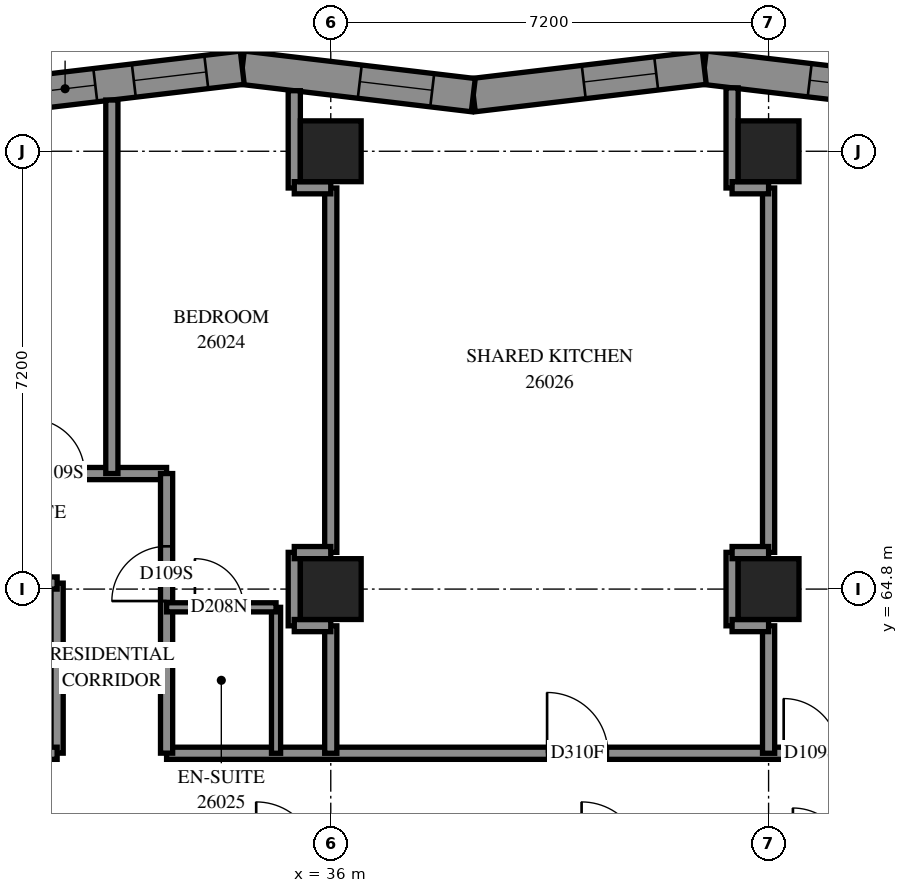
"""IFC4 building model, lengths in metres.
Left out: names, types, materials, properties, quantities, classifications, styles, units other than length and angle.
Written with IfcOpenShell. Run it as: python <this file> out.ifc"""

import sys

from ifc_helpers import new_model, si_unit, direction, frame, frame_2d, origin, origin_2d, place, context, subcontext, project, spatial, polyline, rectangle, outline, extrude, element, fill, save


model = new_model("IFC4")
c1 = context("Model", 3, precision=1e-05, world=origin(), true_north=direction((0.0, 1.0)))
c2 = subcontext(c1, "Body", "Model", "MODEL_VIEW")
j1 = project(units=[si_unit("LENGTHUNIT", "METRE"), si_unit("PLANEANGLEUNIT", "RADIAN")], contexts=[c1])
p1 = place(None, origin())
s1 = spatial("IfcSite", under=j1, at=p1, CompositionType="ELEMENT")
p2 = place(p1, origin())
s2 = spatial("IfcBuilding", under=s1, at=p2, CompositionType="ELEMENT")
p3 = place(p2, frame((0.0, 0.0, 98.2)))
s3 = spatial("IfcBuildingStorey", under=s2, at=p3, CompositionType="ELEMENT", Elevation=98.2)
for number, where, z_axis, x_axis in (
    (1, (36.0, 64.8, 0.0), (0.0, 0.0, 1.0), (1.0, 0.0, 0.0)),
    (2, (36.0, 72.0, 0.0), (0.0, 0.0, 1.0), (1.0, 0.0, 0.0)),
    (3, (43.2, 64.8, 0.0), (0.0, 0.0, 1.0), (1.0, 0.0, 0.0)),
    (4, (43.2, 72.0, 0.0), (0.0, 0.0, 1.0), (1.0, 0.0, 0.0)),
):
    element("IfcColumn", number, at=place(p3, frame(where, z_axis=z_axis, x_axis=x_axis)), inside=s3, PredefinedType="COLUMN", context=c2, shape_type="SweptSolid", body=[
        extrude(rectangle(XDim=1.0, YDim=1.0, at=origin_2d()), origin(), (0.0, 0.0, 1.0), 3.1),
    ])
p4 = place(p3, frame((45.942, 72.923, 0.0), z_axis=(0.0, 0.0, 1.0), x_axis=(-0.9930269402, 0.1178876415, 0.0)))
e5 = element("IfcWall", 5, at=p4, inside=s3, PredefinedType="SOLIDWALL", context=c2, shape_type="SweptSolid", body=[
    extrude(outline(polyline([(0.033, -0.275), (3.858, -0.275), (3.793, 0.275), (-0.033, 0.275), (0.033, -0.275)])), origin(), (0.0, 0.0, 1.0), 3.1),
])
p5 = place(p4, frame((0.88, 0.0, 0.5)))
e6 = element("IfcOpeningElement", 6, at=p5, cuts=e5, PredefinedType="OPENING", context=c2, shape_type="SweptSolid", body=[
    extrude(rectangle(XDim=1.2, YDim=2.45, at=frame_2d((0.6, 1.225))), frame((0.0, 0.285, 0.0), z_axis=(0.0, -1.0, 0.0), x_axis=(1.0, 0.0, 0.0)), (0.0, 0.0, 1.0), 0.57),
])
p6 = place(p3, frame((42.143, 73.374, 0.0), z_axis=(0.0, 0.0, 1.0), x_axis=(-0.9930269402, -0.1178876415, 0.0)))
e7 = element("IfcWall", 7, at=p6, inside=s3, PredefinedType="SOLIDWALL", context=c2, shape_type="SweptSolid", body=[
    extrude(outline(polyline([(-0.033, -0.275), (3.793, -0.275), (3.858, 0.275), (0.033, 0.275), (-0.033, -0.275)])), origin(), (0.0, 0.0, 1.0), 3.1),
])
p7 = place(p6, frame((0.797, 0.0, 0.5)))
e8 = element("IfcOpeningElement", 8, at=p7, cuts=e7, PredefinedType="OPENING", context=c2, shape_type="SweptSolid", body=[
    extrude(rectangle(XDim=1.2, YDim=2.45, at=frame_2d((0.6, 1.225))), frame((0.0, 0.285, 0.0), z_axis=(0.0, -1.0, 0.0), x_axis=(1.0, 0.0, 0.0)), (0.0, 0.0, 1.0), 0.57),
])
p8 = place(p3, frame((38.344, 72.923, 0.0), z_axis=(0.0, 0.0, 1.0), x_axis=(-0.9930265769, 0.1178907016, 0.0)))
e9 = element("IfcWall", 9, at=p8, inside=s3, PredefinedType="SOLIDWALL", context=c2, shape_type="SweptSolid", body=[
    extrude(outline(polyline([(0.033, -0.275), (3.858, -0.275), (3.793, 0.275), (-0.033, 0.275), (0.033, -0.275)])), origin(), (0.0, 0.0, 1.0), 3.1),
])
p9 = place(p8, frame((0.68, 0.0, 0.5)))
e10 = element("IfcOpeningElement", 10, at=p9, cuts=e9, PredefinedType="OPENING", context=c2, shape_type="SweptSolid", body=[
    extrude(rectangle(XDim=1.2, YDim=2.45, at=frame_2d((0.6, 1.225))), frame((0.0, 0.285, 0.0), z_axis=(0.0, -1.0, 0.0), x_axis=(1.0, 0.0, 0.0)), (0.0, 0.0, 1.0), 0.57),
])
p10 = place(p3, frame((34.545, 73.374, 0.0), z_axis=(0.0, 0.0, 1.0), x_axis=(-0.9930269402, -0.1178876415, 0.0)))
e11 = element("IfcWall", 11, at=p10, inside=s3, PredefinedType="SOLIDWALL", context=c2, shape_type="SweptSolid", body=[
    extrude(outline(polyline([(-0.033, -0.275), (3.793, -0.275), (3.858, 0.275), (0.033, 0.275), (-0.033, -0.275)])), origin(), (0.0, 0.0, 1.0), 3.1),
])
p11 = place(p10, frame((0.596, 0.0, 0.5)))
e12 = element("IfcOpeningElement", 12, at=p11, cuts=e11, PredefinedType="OPENING", context=c2, shape_type="SweptSolid", body=[
    extrude(rectangle(XDim=1.2, YDim=2.45, at=frame_2d((0.6, 1.225))), frame((0.0, 0.285, 0.0), z_axis=(0.0, -1.0, 0.0), x_axis=(1.0, 0.0, 0.0)), (0.0, 0.0, 1.0), 0.57),
])
p12 = place(p10, frame((2.434, 0.0, 0.45)))
e13 = element("IfcOpeningElement", 13, at=p12, cuts=e11, PredefinedType="OPENING", context=c2, shape_type="SweptSolid", body=[
    extrude(rectangle(XDim=1.0, YDim=2.5, at=frame_2d((0.5, 1.25))), frame((0.0, 0.285, 0.0), z_axis=(0.0, -1.0, 0.0), x_axis=(1.0, 0.0, 0.0)), (0.0, 0.0, 1.0), 0.57),
])
p13 = place(p3, frame((33.3, 62.1, 0.0), z_axis=(0.0, 0.0, 1.0), x_axis=(1.0, 0.0, 0.0)))
e14 = element("IfcWall", 14, at=p13, inside=s3, PredefinedType="PARTITIONING", context=c2, shape_type="SweptSolid", body=[
    extrude(rectangle(XDim=17.1, YDim=0.2, at=frame_2d((8.55, 0.0))), origin(), (0.0, 0.0, 1.0), 3.1),
])
p14 = place(p13, frame((6.258, 0.0, 0.0)))
e15 = element("IfcOpeningElement", 15, at=p14, cuts=e14, PredefinedType="OPENING", context=c2, shape_type="SweptSolid", body=[
    extrude(rectangle(XDim=1.0, YDim=2.1, at=frame_2d((0.5, 1.05))), frame((0.0, 0.11, 0.0), z_axis=(0.0, -1.0, 0.0), x_axis=(1.0, 0.0, 0.0)), (0.0, 0.0, 1.0), 0.22),
])
p15 = place(p13, frame((10.148, 0.0, 0.0)))
e16 = element("IfcOpeningElement", 16, at=p15, cuts=e14, PredefinedType="OPENING", context=c2, shape_type="SweptSolid", body=[
    extrude(rectangle(XDim=0.9, YDim=2.1, at=frame_2d((0.45, 1.05))), frame((0.0, 0.11, 0.0), z_axis=(0.0, -1.0, 0.0), x_axis=(1.0, 0.0, 0.0)), (0.0, 0.0, 1.0), 0.22),
])
p16 = place(p13, frame((15.729, 0.0, 0.0)))
e17 = element("IfcOpeningElement", 17, at=p16, cuts=e14, PredefinedType="OPENING", context=c2, shape_type="SweptSolid", body=[
    extrude(rectangle(XDim=0.9, YDim=2.1, at=frame_2d((0.45, 1.05))), frame((0.0, 0.11, 0.0), z_axis=(0.0, -1.0, 0.0), x_axis=(1.0, 0.0, 0.0)), (0.0, 0.0, 1.0), 0.22),
])
p17 = place(p3, frame((21.602, 66.7, 0.0), z_axis=(0.0, 0.0, 1.0), x_axis=(1.0, 0.0, 0.0)))
e18 = element("IfcWall", 18, at=p17, inside=s3, PredefinedType="PARTITIONING", context=c2, shape_type="SweptSolid", body=[
    extrude(rectangle(XDim=11.698, YDim=0.2, at=frame_2d((5.849, 0.0))), origin(), (0.0, 0.0, 1.0), 3.1),
])
p18 = place(p17, frame((1.79, 0.0, 0.0)))
e19 = element("IfcOpeningElement", 19, at=p18, cuts=e18, PredefinedType="OPENING", context=c2, shape_type="SweptSolid", body=[
    extrude(rectangle(XDim=1.0, YDim=2.1, at=frame_2d((0.5, 1.05))), frame((0.0, 0.11, 0.0), z_axis=(0.0, -1.0, 0.0), x_axis=(1.0, 0.0, 0.0)), (0.0, 0.0, 1.0), 0.22),
])
p19 = place(p17, frame((3.998, 0.0, 0.0)))
e20 = element("IfcOpeningElement", 20, at=p19, cuts=e18, PredefinedType="OPENING", context=c2, shape_type="SweptSolid", body=[
    extrude(rectangle(XDim=0.9, YDim=2.1, at=frame_2d((0.45, 1.05))), frame((0.0, 0.11, 0.0), z_axis=(0.0, -1.0, 0.0), x_axis=(1.0, 0.0, 0.0)), (0.0, 0.0, 1.0), 0.22),
])
p20 = place(p17, frame((9.448, 0.0, 0.0)))
e21 = element("IfcOpeningElement", 21, at=p20, cuts=e18, PredefinedType="OPENING", context=c2, shape_type="SweptSolid", body=[
    extrude(rectangle(XDim=0.9, YDim=2.1, at=frame_2d((0.45, 1.05))), frame((0.0, 0.11, 0.0), z_axis=(0.0, -1.0, 0.0), x_axis=(1.0, 0.0, 0.0)), (0.0, 0.0, 1.0), 0.22),
])
p21 = place(p3, frame((32.4, 66.7, 0.0), z_axis=(0.0, 0.0, 1.0), x_axis=(0.0, 1.0, 0.0)))
e22 = element("IfcWall", 22, at=p21, inside=s3, PredefinedType="PARTITIONING", context=c2, shape_type="SweptSolid", body=[
    extrude(rectangle(XDim=6.143, YDim=0.2, at=frame_2d((3.071, 0.0))), origin(), (0.0, 0.0, 1.0), 3.1),
])
for number, where, z_axis, x_axis in (
    (23, (36.0, 65.404, 0.0), (0.0, 0.0, 1.0), (0.0, 1.0, 0.0)),
    (24, (43.2, 65.404, 0.0), (0.0, 0.0, 1.0), (0.0, 1.0, 0.0)),
):
    element("IfcWall", number, at=place(p3, frame(where, z_axis=z_axis, x_axis=x_axis)), inside=s3, PredefinedType="PARTITIONING", context=c2, shape_type="SweptSolid", body=[
        extrude(rectangle(XDim=5.992, YDim=0.2, at=frame_2d((2.996, 0.0))), origin(), (0.0, 0.0, 1.0), 3.1),
    ])
p22 = place(p3, frame((33.3, 62.102, 0.0), z_axis=(0.0, 0.0, 1.0), x_axis=(0.0, 1.0, 0.0)))
e25 = element("IfcWall", 25, at=p22, inside=s3, PredefinedType="PARTITIONING", context=c2, shape_type="SweptSolid", body=[
    extrude(rectangle(XDim=4.598, YDim=0.2, at=frame_2d((2.299, 0.0))), origin(), (0.0, 0.0, 1.0), 3.1),
])
p23 = place(p22, frame((2.501, 0.0, 0.0)))
e26 = element("IfcOpeningElement", 26, at=p23, cuts=e25, PredefinedType="OPENING", context=c2, shape_type="SweptSolid", body=[
    extrude(rectangle(XDim=0.9, YDim=2.1, at=frame_2d((0.45, 1.05))), frame((0.0, 0.11, 0.0), z_axis=(0.0, -1.0, 0.0), x_axis=(1.0, 0.0, 0.0)), (0.0, 0.0, 1.0), 0.22),
])
p24 = place(p3, frame((31.5, 62.102, 0.0), z_axis=(0.0, 0.0, 1.0), x_axis=(0.0, 1.0, 0.0)))
e27 = element("IfcWall", 27, at=p24, inside=s3, PredefinedType="PARTITIONING", context=c2, shape_type="SweptSolid", body=[
    extrude(rectangle(XDim=2.796, YDim=0.2, at=frame_2d((1.398, 0.0))), origin(), (0.0, 0.0, 1.0), 3.1),
])
p25 = place(p3, frame((28.802, 62.1, 0.0), z_axis=(0.0, 0.0, 1.0), x_axis=(1.0, 0.0, 0.0)))
e28 = element("IfcWall", 28, at=p25, inside=s3, PredefinedType="PARTITIONING", context=c2, shape_type="SweptSolid", body=[
    extrude(rectangle(XDim=2.698, YDim=0.2, at=frame_2d((1.349, 0.0))), origin(), (0.0, 0.0, 1.0), 3.1),
])
p26 = place(p3, frame((35.1, 62.1, 0.0), z_axis=(0.0, 0.0, 1.0), x_axis=(0.0, 1.0, 0.0)))
e29 = element("IfcWall", 29, at=p26, inside=s3, PredefinedType="PARTITIONING", context=c2, shape_type="SweptSolid", body=[
    extrude(rectangle(XDim=2.4, YDim=0.15, at=frame_2d((1.2, 0.0))), origin(), (0.0, 0.0, 1.0), 3.1),
])
p27 = place(p3, frame((29.3, 64.9, 0.0), z_axis=(0.0, 0.0, 1.0), x_axis=(1.0, 0.0, 0.0)))
e30 = element("IfcWall", 30, at=p27, inside=s3, PredefinedType="PARTITIONING", context=c2, shape_type="SweptSolid", body=[
    extrude(rectangle(XDim=2.2, YDim=0.2, at=frame_2d((1.1, 0.0))), origin(), (0.0, 0.0, 1.0), 3.1),
])
p28 = place(p27, frame((0.31, 0.0, 0.0)))
e31 = element("IfcOpeningElement", 31, at=p28, cuts=e30, PredefinedType="OPENING", context=c2, shape_type="SweptSolid", body=[
    extrude(rectangle(XDim=1.0, YDim=2.1, at=frame_2d((0.5, 1.05))), frame((0.0, 0.11, 0.0), z_axis=(0.0, -1.0, 0.0), x_axis=(1.0, 0.0, 0.0)), (0.0, 0.0, 1.0), 0.22),
])
for number, where, z_axis, x_axis in (
    (32, (36.0, 62.1, 0.0), (0.0, 0.0, 1.0), (0.0, 1.0, 0.0)),
    (33, (43.2, 62.1, 0.0), (0.0, 0.0, 1.0), (0.0, 1.0, 0.0)),
):
    element("IfcWall", number, at=place(p3, frame(where, z_axis=z_axis, x_axis=x_axis)), inside=s3, PredefinedType="PARTITIONING", context=c2, shape_type="SweptSolid", body=[
        extrude(rectangle(XDim=2.096, YDim=0.2, at=frame_2d((1.048, 0.0))), origin(), (0.0, 0.0, 1.0), 3.1),
    ])
p29 = place(p3, frame((33.3, 64.5, 0.0), z_axis=(0.0, 0.0, 1.0), x_axis=(1.0, 0.0, 0.0)))
e34 = element("IfcWall", 34, at=p29, inside=s3, PredefinedType="PARTITIONING", context=c2, shape_type="SweptSolid", body=[
    extrude(rectangle(XDim=1.8, YDim=0.15, at=frame_2d((0.9, 0.0))), origin(), (0.0, 0.0, 1.0), 3.1),
])
p30 = place(p29, frame((0.466, 0.0, 0.0)))
e35 = element("IfcOpeningElement", 35, at=p30, cuts=e34, PredefinedType="OPENING", context=c2, shape_type="SweptSolid", body=[
    extrude(rectangle(XDim=0.8, YDim=2.1, at=frame_2d((0.4, 1.05))), frame((0.0, 0.085, 0.0), z_axis=(0.0, -1.0, 0.0), x_axis=(1.0, 0.0, 0.0)), (0.0, 0.0, 1.0), 0.17),
])
p31 = place(p3, frame((42.6, 71.396, 0.0), z_axis=(0.0, 0.0, 1.0), x_axis=(0.0, 1.0, 0.0)))
e36 = element("IfcWall", 36, at=p31, inside=s3, PredefinedType="PARTITIONING", context=c2, shape_type="SweptSolid", body=[
    extrude(rectangle(XDim=1.647, YDim=0.2, at=frame_2d((0.824, 0.0))), origin(), (0.0, 0.0, 1.0), 3.1),
])
p32 = place(p3, frame((35.4, 71.396, 0.0), z_axis=(0.0, 0.0, 1.0), x_axis=(0.0, 1.0, 0.0)))
e37 = element("IfcWall", 37, at=p32, inside=s3, PredefinedType="PARTITIONING", context=c2, shape_type="SweptSolid", body=[
    extrude(rectangle(XDim=1.6, YDim=0.2, at=frame_2d((0.8, 0.0))), origin(), (0.0, 0.0, 1.0), 3.1),
])
for number, where, z_axis, x_axis in (
    (38, (35.4, 64.196, 0.0), (0.0, 0.0, 1.0), (0.0, 1.0, 0.0)),
    (39, (42.6, 64.196, 0.0), (0.0, 0.0, 1.0), (0.0, 1.0, 0.0)),
):
    element("IfcWall", number, at=place(p3, frame(where, z_axis=z_axis, x_axis=x_axis)), inside=s3, PredefinedType="PARTITIONING", context=c2, shape_type="SweptSolid", body=[
        extrude(rectangle(XDim=1.208, YDim=0.2, at=frame_2d((0.604, 0.0))), origin(), (0.0, 0.0, 1.0), 3.1),
    ])
for number, where, z_axis, x_axis in (
    (40, (35.4, 71.4, 0.0), (0.0, 0.0, 1.0), (1.0, 0.0, 0.0)),
    (41, (42.6, 71.4, 0.0), (0.0, 0.0, 1.0), (1.0, 0.0, 0.0)),
    (42, (35.4, 65.4, 0.0), (0.0, 0.0, 1.0), (1.0, 0.0, 0.0)),
    (43, (42.6, 65.4, 0.0), (0.0, 0.0, 1.0), (1.0, 0.0, 0.0)),
    (44, (35.4, 64.2, 0.0), (0.0, 0.0, 1.0), (1.0, 0.0, 0.0)),
    (45, (42.6, 64.2, 0.0), (0.0, 0.0, 1.0), (1.0, 0.0, 0.0)),
):
    element("IfcWall", number, at=place(p3, frame(where, z_axis=z_axis, x_axis=x_axis)), inside=s3, PredefinedType="PARTITIONING", context=c2, shape_type="SweptSolid", body=[
        extrude(rectangle(XDim=0.6, YDim=0.2, at=frame_2d((0.3, 0.0))), origin(), (0.0, 0.0, 1.0), 3.1),
    ])
p33 = place(p5, origin())
e46 = element("IfcWindow", 46, at=p33, inside=s3, PartitioningType="SINGLE_PANEL", PredefinedType="WINDOW", context=c2, shape_type="SweptSolid", body=[
    extrude(rectangle(XDim=1.2, YDim=2.45, at=frame_2d((0.6, 1.225))), frame((0.0, 0.155, 0.0), z_axis=(0.0, -1.0, 0.0), x_axis=(1.0, 0.0, 0.0)), (0.0, 0.0, 1.0), 0.06),
])
fill(e6, e46)
p34 = place(p7, origin())
e47 = element("IfcWindow", 47, at=p34, inside=s3, PartitioningType="SINGLE_PANEL", PredefinedType="WINDOW", context=c2, shape_type="SweptSolid", body=[
    extrude(rectangle(XDim=1.2, YDim=2.45, at=frame_2d((0.6, 1.225))), frame((0.0, 0.155, 0.0), z_axis=(0.0, -1.0, 0.0), x_axis=(1.0, 0.0, 0.0)), (0.0, 0.0, 1.0), 0.06),
])
fill(e8, e47)
p35 = place(p9, origin())
e48 = element("IfcWindow", 48, at=p35, inside=s3, PartitioningType="SINGLE_PANEL", PredefinedType="WINDOW", context=c2, shape_type="SweptSolid", body=[
    extrude(rectangle(XDim=1.2, YDim=2.45, at=frame_2d((0.6, 1.225))), frame((0.0, 0.155, 0.0), z_axis=(0.0, -1.0, 0.0), x_axis=(1.0, 0.0, 0.0)), (0.0, 0.0, 1.0), 0.06),
])
fill(e10, e48)
p36 = place(p11, origin())
e49 = element("IfcWindow", 49, at=p36, inside=s3, PartitioningType="SINGLE_PANEL", PredefinedType="WINDOW", context=c2, shape_type="SweptSolid", body=[
    extrude(rectangle(XDim=1.2, YDim=2.45, at=frame_2d((0.6, 1.225))), frame((0.0, 0.155, 0.0), z_axis=(0.0, -1.0, 0.0), x_axis=(1.0, 0.0, 0.0)), (0.0, 0.0, 1.0), 0.06),
])
fill(e12, e49)
p37 = place(p20, origin())
e50 = element("IfcDoor", 50, at=p37, inside=s3, OperationType="SINGLE_SWING_RIGHT", PredefinedType="DOOR", context=c2, shape_type="SweptSolid", body=[
    extrude(rectangle(XDim=0.9, YDim=2.1, at=frame_2d((0.45, 1.05))), frame((0.0, 0.025, 0.0), z_axis=(0.0, -1.0, 0.0), x_axis=(1.0, 0.0, 0.0)), (0.0, 0.0, 1.0), 0.05),
])
fill(e21, e50)
p38 = place(p23, origin())
e51 = element("IfcDoor", 51, at=p38, inside=s3, OperationType="SINGLE_SWING_LEFT", PredefinedType="DOOR", context=c2, shape_type="SweptSolid", body=[
    extrude(rectangle(XDim=0.9, YDim=2.1, at=frame_2d((0.45, 1.05))), frame((0.0, 0.025, 0.0), z_axis=(0.0, -1.0, 0.0), x_axis=(1.0, 0.0, 0.0)), (0.0, 0.0, 1.0), 0.05),
])
fill(e26, e51)
p39 = place(p30, origin())
e52 = element("IfcDoor", 52, at=p39, inside=s3, OperationType="SINGLE_SWING_RIGHT", PredefinedType="DOOR", context=c2, shape_type="SweptSolid", body=[
    extrude(rectangle(XDim=0.8, YDim=2.1, at=frame_2d((0.4, 1.05))), frame((0.0, 0.025, 0.0), z_axis=(0.0, -1.0, 0.0), x_axis=(1.0, 0.0, 0.0)), (0.0, 0.0, 1.0), 0.05),
])
fill(e35, e52)
p40 = place(p14, origin())
e53 = element("IfcDoor", 53, at=p40, inside=s3, OperationType="SINGLE_SWING_RIGHT", PredefinedType="DOOR", context=c2, shape_type="SweptSolid", body=[
    extrude(rectangle(XDim=1.0, YDim=2.1, at=frame_2d((0.5, 1.05))), frame((0.0, 0.025, 0.0), z_axis=(0.0, -1.0, 0.0), x_axis=(1.0, 0.0, 0.0)), (0.0, 0.0, 1.0), 0.05),
])
fill(e15, e53)
p41 = place(p15, origin())
e54 = element("IfcDoor", 54, at=p41, inside=s3, OperationType="SINGLE_SWING_RIGHT", PredefinedType="DOOR", context=c2, shape_type="SweptSolid", body=[
    extrude(rectangle(XDim=0.9, YDim=2.1, at=frame_2d((0.45, 1.05))), frame((0.0, 0.025, 0.0), z_axis=(0.0, -1.0, 0.0), x_axis=(1.0, 0.0, 0.0)), (0.0, 0.0, 1.0), 0.05),
])
fill(e16, e54)
p42 = place(p12, origin())
e55 = element("IfcWindow", 55, at=p42, inside=s3, PartitioningType="SINGLE_PANEL", PredefinedType="WINDOW", context=c2, shape_type="SweptSolid", body=[
    extrude(rectangle(XDim=1.0, YDim=2.5, at=frame_2d((0.5, 1.25))), frame((0.0, 0.155, 0.0), z_axis=(0.0, -1.0, 0.0), x_axis=(1.0, 0.0, 0.0)), (0.0, 0.0, 1.0), 0.06),
])
fill(e13, e55)
save(model, sys.argv[1])
